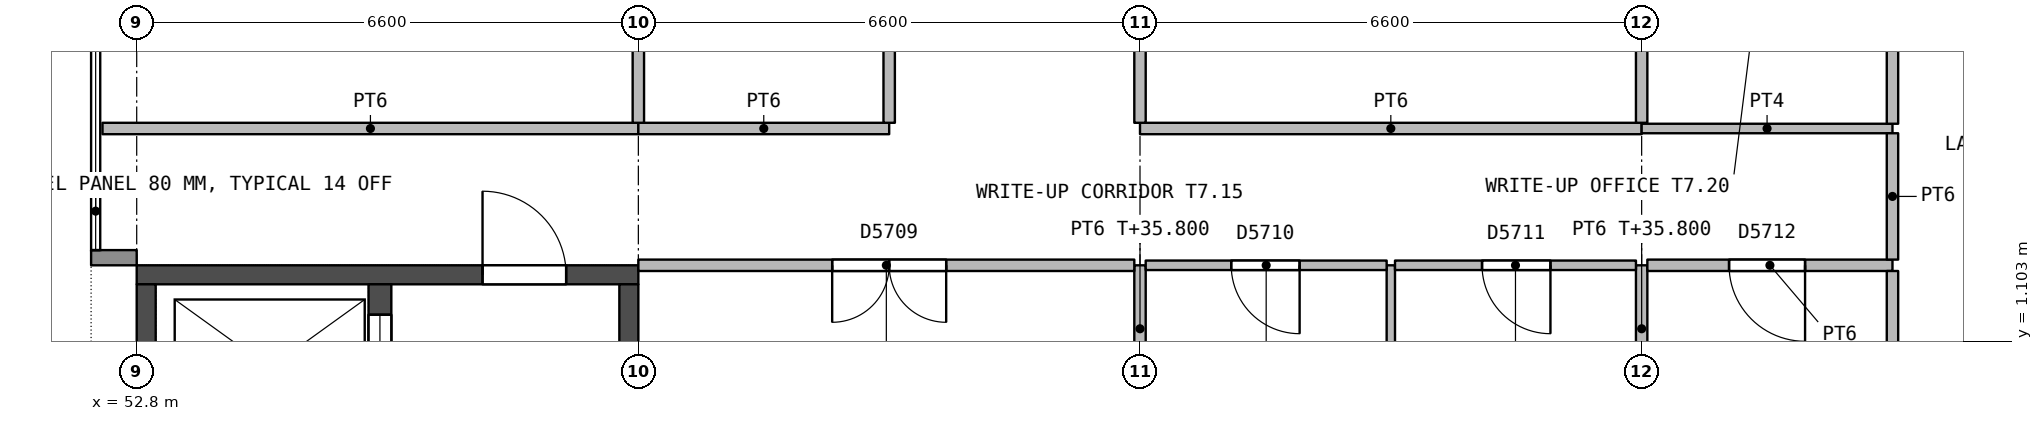
"""IFC4 building model, lengths in metres.
Left out: names, types, materials, properties, quantities, classifications, styles, units other than length and angle.
Written with IfcOpenShell. Run it as: python <this file> out.ifc"""

import sys

from ifc_helpers import new_model, si_unit, direction, frame, frame_2d, origin, place, context, subcontext, project, spatial, rectangle, extrude, element, fill, save


model = new_model("IFC4")
c1 = context("Model", 3, precision=1e-05, world=origin(), true_north=direction((0.0, 1.0)))
c2 = subcontext(c1, "Body", "Model", "MODEL_VIEW")
j1 = project(units=[si_unit("LENGTHUNIT", "METRE"), si_unit("PLANEANGLEUNIT", "RADIAN")], contexts=[c1])
p1 = place(None, origin())
s1 = spatial("IfcSite", under=j1, at=p1, CompositionType="ELEMENT")
p2 = place(p1, origin())
s2 = spatial("IfcBuilding", under=s1, at=p2, CompositionType="ELEMENT")
p3 = place(p2, frame((0.0, 0.0, 32.4)))
s3 = spatial("IfcBuildingStorey", under=s2, at=p3, CompositionType="ELEMENT", Elevation=32.4)
p4 = place(p3, frame((59.4, 1.975, 0.0), z_axis=(0.0, 0.0, 1.0), x_axis=(-1.0, 0.0, 0.0)))
e1 = element("IfcWall", 1, at=p4, inside=s3, PredefinedType="SHEAR", context=c2, shape_type="SweptSolid", body=[
    extrude(rectangle(XDim=6.6, YDim=0.25, at=frame_2d((3.3, 0.0))), origin(), (0.0, 0.0, 1.0), 4.2),
])
p5 = place(p4, frame((0.95, 0.0, 0.0)))
e2 = element("IfcOpeningElement", 2, at=p5, cuts=e1, PredefinedType="OPENING", context=c2, shape_type="SweptSolid", body=[
    extrude(rectangle(XDim=1.1, YDim=2.1, at=frame_2d((0.55, 1.05))), frame((0.0, 0.135, 0.0), z_axis=(0.0, -1.0, 0.0), x_axis=(1.0, 0.0, 0.0)), (0.0, 0.0, 1.0), 0.27),
])
for number, where, z_axis, x_axis in (
    (3, (59.275, 1.85, 0.0), (0.0, 0.0, 1.0), (0.0, -1.0, 0.0)),
    (4, (52.925, 1.85, 0.0), (0.0, 0.0, 1.0), (0.0, -1.0, 0.0)),
):
    element("IfcWall", number, at=place(p3, frame(where, z_axis=z_axis, x_axis=x_axis)), inside=s3, PredefinedType="SHEAR", context=c2, shape_type="SweptSolid", body=[
        extrude(rectangle(XDim=9.4, YDim=0.25, at=frame_2d((4.7, 0.0))), origin(), (0.0, 0.0, 1.0), 4.2),
    ])
p6 = place(p3, frame((56.0, 1.85, 0.0), z_axis=(0.0, 0.0, 1.0), x_axis=(0.0, -1.0, 0.0)))
e5 = element("IfcWall", 5, at=p6, inside=s3, PredefinedType="SHEAR", context=c2, shape_type="SweptSolid", body=[
    extrude(rectangle(XDim=6.35, YDim=0.3, at=frame_2d((3.175, 0.0))), origin(), (0.0, 0.0, 1.0), 4.2),
])
p7 = place(p6, frame((3.925, 0.0, 0.0)))
e6 = element("IfcOpeningElement", 6, at=p7, cuts=e5, PredefinedType="OPENING", context=c2, shape_type="SweptSolid", body=[
    extrude(rectangle(XDim=0.9, YDim=2.1, at=frame_2d((0.45, 1.05))), frame((0.0, 0.16, 0.0), z_axis=(0.0, -1.0, 0.0), x_axis=(1.0, 0.0, 0.0)), (0.0, 0.0, 1.0), 0.32),
])
p8 = place(p6, frame((0.4, 0.0, 0.0)))
e7 = element("IfcOpeningElement", 7, at=p8, cuts=e5, PredefinedType="OPENING", context=c2, shape_type="SweptSolid", body=[
    extrude(rectangle(XDim=1.4, YDim=2.4, at=frame_2d((0.7, 1.2))), frame((0.0, 0.16, 0.0), z_axis=(0.0, -1.0, 0.0), x_axis=(1.0, 0.0, 0.0)), (0.0, 0.0, 1.0), 0.32),
])
p9 = place(p3, frame((52.8, 2.2, 0.0), z_axis=(0.0, 0.0, 1.0), x_axis=(-1.0, 0.0, 0.0)))
e8 = element("IfcWall", 8, at=p9, inside=s3, PredefinedType="STANDARD", context=c2, shape_type="SweptSolid", body=[
    extrude(rectangle(XDim=0.6, YDim=0.2, at=frame_2d((0.3, 0.0))), origin(), (0.0, 0.0, 1.0), 3.55),
])
p10 = place(p3, frame((66.0, 0.35, 0.0), z_axis=(0.0, 0.0, 1.0), x_axis=(0.0, 1.0, 0.0)))
e9 = element("IfcWall", 9, at=p10, inside=s3, PredefinedType="PARTITIONING", context=c2, shape_type="SweptSolid", body=[
    extrude(rectangle(XDim=1.75, YDim=0.15, at=frame_2d((0.875, 0.0))), origin(), (0.0, 0.0, 1.0), 3.4),
])
p11 = place(p3, frame((65.925, 2.1, 0.0), z_axis=(0.0, 0.0, 1.0), x_axis=(-1.0, 0.0, 0.0)))
e10 = element("IfcWall", 10, at=p11, inside=s3, PredefinedType="PARTITIONING", context=c2, shape_type="SweptSolid", body=[
    extrude(rectangle(XDim=6.525, YDim=0.15, at=frame_2d((3.262, 0.0))), origin(), (0.0, 0.0, 1.0), 4.2),
])
p12 = place(p11, frame((2.475, 0.0, 0.0)))
e11 = element("IfcOpeningElement", 11, at=p12, cuts=e10, PredefinedType="OPENING", context=c2, shape_type="SweptSolid", body=[
    extrude(rectangle(XDim=1.5, YDim=2.1, at=frame_2d((0.75, 1.05))), frame((0.0, 0.085, 0.0), z_axis=(0.0, -1.0, 0.0), x_axis=(1.0, 0.0, 0.0)), (0.0, 0.0, 1.0), 0.17),
])
p13 = place(p3, frame((69.3, -8.25, 0.0), z_axis=(0.0, 0.0, 1.0), x_axis=(0.0, 1.0, 0.0)))
e12 = element("IfcWall", 12, at=p13, inside=s3, PredefinedType="PARTITIONING", context=c2, shape_type="SweptSolid", body=[
    extrude(rectangle(XDim=10.35, YDim=0.11, at=frame_2d((5.175, 0.0))), origin(), (0.0, 0.0, 1.0), 4.2),
])
p14 = place(p3, frame((69.245, 2.1, 0.0), z_axis=(0.0, 0.0, 1.0), x_axis=(-1.0, 0.0, 0.0)))
e13 = element("IfcWall", 13, at=p14, inside=s3, PredefinedType="PARTITIONING", context=c2, shape_type="SweptSolid", body=[
    extrude(rectangle(XDim=3.17, YDim=0.125, at=frame_2d((1.585, 0.0))), origin(), (0.0, 0.0, 1.0), 4.2),
])
p15 = place(p14, frame((1.145, 0.0, 0.0)))
e14 = element("IfcOpeningElement", 14, at=p15, cuts=e13, PredefinedType="OPENING", context=c2, shape_type="SweptSolid", body=[
    extrude(rectangle(XDim=0.9, YDim=2.1, at=frame_2d((0.45, 1.05))), frame((0.0, 0.073, 0.0), z_axis=(0.0, -1.0, 0.0), x_axis=(1.0, 0.0, 0.0)), (0.0, 0.0, 1.0), 0.145),
])
p16 = place(p3, frame((72.6, 0.35, 0.0), z_axis=(0.0, 0.0, 1.0), x_axis=(0.0, 1.0, 0.0)))
e15 = element("IfcWall", 15, at=p16, inside=s3, PredefinedType="PARTITIONING", context=c2, shape_type="SweptSolid", body=[
    extrude(rectangle(XDim=1.75, YDim=0.15, at=frame_2d((0.875, 0.0))), origin(), (0.0, 0.0, 1.0), 3.4),
])
p17 = place(p3, frame((72.525, 2.1, 0.0), z_axis=(0.0, 0.0, 1.0), x_axis=(-1.0, 0.0, 0.0)))
e16 = element("IfcWall", 16, at=p17, inside=s3, PredefinedType="PARTITIONING", context=c2, shape_type="SweptSolid", body=[
    extrude(rectangle(XDim=3.17, YDim=0.125, at=frame_2d((1.585, 0.0))), origin(), (0.0, 0.0, 1.0), 4.2),
])
p18 = place(p17, frame((1.125, 0.0, 0.0)))
e17 = element("IfcOpeningElement", 17, at=p18, cuts=e16, PredefinedType="OPENING", context=c2, shape_type="SweptSolid", body=[
    extrude(rectangle(XDim=0.9, YDim=2.1, at=frame_2d((0.45, 1.05))), frame((0.0, 0.073, 0.0), z_axis=(0.0, -1.0, 0.0), x_axis=(1.0, 0.0, 0.0)), (0.0, 0.0, 1.0), 0.145),
])
p19 = place(p3, frame((75.9, 2.1, 0.0), z_axis=(0.0, 0.0, 1.0), x_axis=(-1.0, 0.0, 0.0)))
e18 = element("IfcWall", 18, at=p19, inside=s3, PredefinedType="PARTITIONING", context=c2, shape_type="SweptSolid", body=[
    extrude(rectangle(XDim=3.225, YDim=0.15, at=frame_2d((1.612, 0.0))), origin(), (0.0, 0.0, 1.0), 4.2),
])
p20 = place(p19, frame((1.15, 0.0, 0.0)))
e19 = element("IfcOpeningElement", 19, at=p20, cuts=e18, PredefinedType="OPENING", context=c2, shape_type="SweptSolid", body=[
    extrude(rectangle(XDim=1.0, YDim=2.1, at=frame_2d((0.5, 1.05))), frame((0.0, 0.085, 0.0), z_axis=(0.0, -1.0, 0.0), x_axis=(1.0, 0.0, 0.0)), (0.0, 0.0, 1.0), 0.17),
])
p21 = place(p3, frame((75.9, -8.25, 0.0), z_axis=(0.0, 0.0, 1.0), x_axis=(0.0, 1.0, 0.0)))
e20 = element("IfcWall", 20, at=p21, inside=s3, PredefinedType="PARTITIONING", context=c2, shape_type="SweptSolid", body=[
    extrude(rectangle(XDim=10.275, YDim=0.15, at=frame_2d((5.137, 0.0))), origin(), (0.0, 0.0, 1.0), 4.2),
])
p22 = place(p3, frame((59.4, 3.9, 0.0), z_axis=(0.0, 0.0, 1.0), x_axis=(-1.0, 0.0, 0.0)))
e21 = element("IfcWall", 21, at=p22, inside=s3, PredefinedType="PARTITIONING", context=c2, shape_type="SweptSolid", body=[
    extrude(rectangle(XDim=7.05, YDim=0.15, at=frame_2d((3.525, 0.0))), origin(), (0.0, 0.0, 1.0), 4.2),
])
p23 = place(p3, frame((62.7, 3.9, 0.0), z_axis=(0.0, 0.0, 1.0), x_axis=(-1.0, 0.0, 0.0)))
e22 = element("IfcWall", 22, at=p23, inside=s3, PredefinedType="PARTITIONING", context=c2, shape_type="SweptSolid", body=[
    extrude(rectangle(XDim=3.3, YDim=0.15, at=frame_2d((1.65, 0.0))), origin(), (0.0, 0.0, 1.0), 4.2),
])
p24 = place(p3, frame((72.6, 3.9, 0.0), z_axis=(0.0, 0.0, 1.0), x_axis=(-1.0, 0.0, 0.0)))
e23 = element("IfcWall", 23, at=p24, inside=s3, PredefinedType="PARTITIONING", context=c2, shape_type="SweptSolid", body=[
    extrude(rectangle(XDim=6.6, YDim=0.15, at=frame_2d((3.3, 0.0))), origin(), (0.0, 0.0, 1.0), 4.2),
])
p25 = place(p3, frame((75.9, 3.9, 0.0), z_axis=(0.0, 0.0, 1.0), x_axis=(-1.0, 0.0, 0.0)))
e24 = element("IfcWall", 24, at=p25, inside=s3, PredefinedType="PARTITIONING", context=c2, shape_type="SweptSolid", body=[
    extrude(rectangle(XDim=3.3, YDim=0.125, at=frame_2d((1.65, 0.0))), origin(), (0.0, 0.0, 1.0), 4.2),
])
p26 = place(p3, frame((75.9, 2.175, 0.0), z_axis=(0.0, 0.0, 1.0), x_axis=(0.0, 1.0, 0.0)))
e25 = element("IfcWall", 25, at=p26, inside=s3, PredefinedType="PARTITIONING", context=c2, shape_type="SweptSolid", body=[
    extrude(rectangle(XDim=1.662, YDim=0.15, at=frame_2d((0.831, 0.0))), origin(), (0.0, 0.0, 1.0), 4.2),
])
p27 = place(p3, frame((59.4, 3.975, 0.0), z_axis=(0.0, 0.0, 1.0), x_axis=(0.0, 1.0, 0.0)))
e26 = element("IfcWall", 26, at=p27, inside=s3, PredefinedType="PARTITIONING", context=c2, shape_type="SweptSolid", body=[
    extrude(rectangle(XDim=5.575, YDim=0.15, at=frame_2d((2.788, 0.0))), origin(), (0.0, 0.0, 1.0), 3.4),
])
p28 = place(p3, frame((62.7, 9.825, 0.0), z_axis=(0.0, 0.0, 1.0), x_axis=(0.0, -1.0, 0.0)))
e27 = element("IfcWall", 27, at=p28, inside=s3, PredefinedType="PARTITIONING", context=c2, shape_type="SweptSolid", body=[
    extrude(rectangle(XDim=5.85, YDim=0.15, at=frame_2d((2.925, 0.0))), origin(), (0.0, 0.0, 1.0), 4.2),
])
p29 = place(p28, frame((2.425, 0.0, 0.0)))
e28 = element("IfcOpeningElement", 28, at=p29, cuts=e27, PredefinedType="OPENING", context=c2, shape_type="SweptSolid", body=[
    extrude(rectangle(XDim=1.0, YDim=2.1, at=frame_2d((0.5, 1.05))), frame((0.0, 0.085, 0.0), z_axis=(0.0, -1.0, 0.0), x_axis=(1.0, 0.0, 0.0)), (0.0, 0.0, 1.0), 0.17),
])
for number, where, z_axis, x_axis in (
    (29, (66.0, 3.975, 0.0), (0.0, 0.0, 1.0), (0.0, 1.0, 0.0)),
    (30, (72.6, 3.975, 0.0), (0.0, 0.0, 1.0), (0.0, 1.0, 0.0)),
):
    element("IfcWall", number, at=place(p3, frame(where, z_axis=z_axis, x_axis=x_axis)), inside=s3, PredefinedType="PARTITIONING", context=c2, shape_type="SweptSolid", body=[
        extrude(rectangle(XDim=5.575, YDim=0.15, at=frame_2d((2.788, 0.0))), origin(), (0.0, 0.0, 1.0), 3.4),
    ])
p30 = place(p3, frame((75.9, 3.962, 0.0), z_axis=(0.0, 0.0, 1.0), x_axis=(0.0, 1.0, 0.0)))
e31 = element("IfcWall", 31, at=p30, inside=s3, PredefinedType="PARTITIONING", context=c2, shape_type="SweptSolid", body=[
    extrude(rectangle(XDim=5.863, YDim=0.15, at=frame_2d((2.931, 0.0))), origin(), (0.0, 0.0, 1.0), 4.2),
])
p31 = place(p5, origin())
e32 = element("IfcDoor", 32, at=p31, inside=s3, OperationType="SINGLE_SWING_RIGHT", PredefinedType="DOOR", context=c2, shape_type="SweptSolid", body=[
    extrude(rectangle(XDim=1.1, YDim=2.1, at=frame_2d((0.55, 1.05))), frame((0.0, 0.025, 0.0), z_axis=(0.0, -1.0, 0.0), x_axis=(1.0, 0.0, 0.0)), (0.0, 0.0, 1.0), 0.05),
])
fill(e2, e32)
p32 = place(p8, origin())
e33 = element("IfcDoor", 33, at=p32, inside=s3, OperationType="DOUBLE_DOOR_SLIDING", PredefinedType="NOTDEFINED", context=c2, shape_type="SweptSolid", body=[
    extrude(rectangle(XDim=1.4, YDim=2.4, at=frame_2d((0.7, 1.2))), frame((0.0, 0.025, 0.0), z_axis=(0.0, -1.0, 0.0), x_axis=(1.0, 0.0, 0.0)), (0.0, 0.0, 1.0), 0.05),
])
fill(e7, e33)
p33 = place(p12, origin())
e34 = element("IfcDoor", 34, at=p33, inside=s3, OperationType="DOUBLE_DOOR_SINGLE_SWING", PredefinedType="DOOR", context=c2, shape_type="SweptSolid", body=[
    extrude(rectangle(XDim=1.5, YDim=2.1, at=frame_2d((0.75, 1.05))), frame((0.0, 0.027, 0.0), z_axis=(0.0, -1.0, 0.0), x_axis=(1.0, 0.0, 0.0)), (0.0, 0.0, 1.0), 0.054),
])
fill(e11, e34)
p34 = place(p15, origin())
e35 = element("IfcDoor", 35, at=p34, inside=s3, OperationType="SINGLE_SWING_LEFT", PredefinedType="DOOR", context=c2, shape_type="SweptSolid", body=[
    extrude(rectangle(XDim=0.9, YDim=2.1, at=frame_2d((0.45, 1.05))), frame((0.0, 0.027, 0.0), z_axis=(0.0, -1.0, 0.0), x_axis=(1.0, 0.0, 0.0)), (0.0, 0.0, 1.0), 0.054),
])
fill(e14, e35)
p35 = place(p18, origin())
e36 = element("IfcDoor", 36, at=p35, inside=s3, OperationType="SINGLE_SWING_LEFT", PredefinedType="DOOR", context=c2, shape_type="SweptSolid", body=[
    extrude(rectangle(XDim=0.9, YDim=2.1, at=frame_2d((0.45, 1.05))), frame((0.0, 0.027, 0.0), z_axis=(0.0, -1.0, 0.0), x_axis=(1.0, 0.0, 0.0)), (0.0, 0.0, 1.0), 0.054),
])
fill(e17, e36)
p36 = place(p20, origin())
e37 = element("IfcDoor", 37, at=p36, inside=s3, OperationType="SINGLE_SWING_LEFT", PredefinedType="DOOR", context=c2, shape_type="SweptSolid", body=[
    extrude(rectangle(XDim=1.0, YDim=2.1, at=frame_2d((0.5, 1.05))), frame((0.0, 0.027, 0.0), z_axis=(0.0, -1.0, 0.0), x_axis=(1.0, 0.0, 0.0)), (0.0, 0.0, 1.0), 0.054),
])
fill(e19, e37)
save(model, sys.argv[1])
